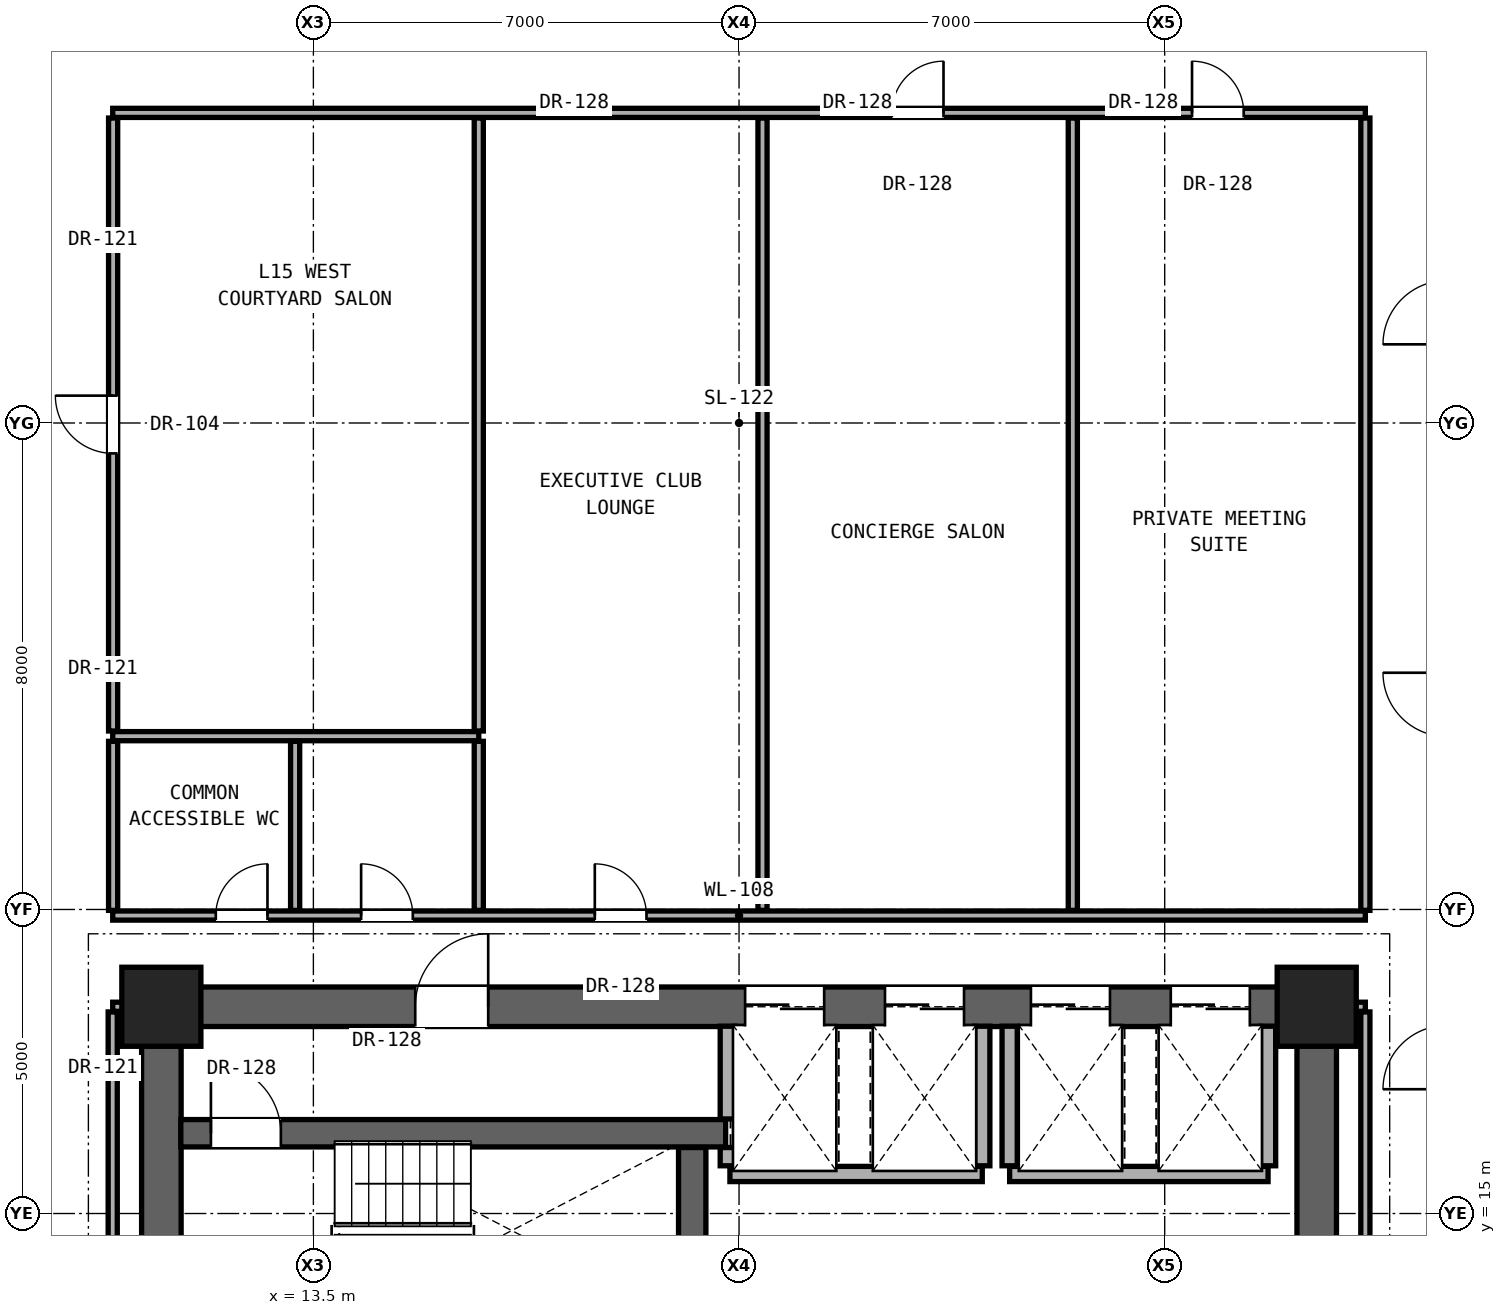
"""IFC4 building model, lengths in metres.
Left out: names, types, materials, properties, quantities, classifications, styles, units other than length and angle.
Written with IfcOpenShell. Run it as: python <this file> out.ifc"""

import sys

from ifc_helpers import new_model, si_unit, direction, frame, frame_2d, origin, origin_2d, place, context, subcontext, project, spatial, rectangle, extrude, element, fill, save


model = new_model("IFC4")
c1 = context("Model", 3, precision=1e-05, world=origin(), true_north=direction((0.0, 1.0)))
c2 = subcontext(c1, "Body", "Model", "MODEL_VIEW")
j1 = project(units=[si_unit("LENGTHUNIT", "METRE"), si_unit("PLANEANGLEUNIT", "RADIAN")], contexts=[c1])
p1 = place(None, origin())
s1 = spatial("IfcSite", under=j1, at=p1, CompositionType="ELEMENT")
p2 = place(p1, origin())
s2 = spatial("IfcBuilding", under=s1, at=p2, CompositionType="ELEMENT")
p3 = place(p2, frame((0.0, 0.0, 55.4)))
s3 = spatial("IfcBuildingStorey", under=s2, at=p3, CompositionType="ELEMENT", Elevation=55.4)
for number, where, z_axis, x_axis in (
    (1, (11.0, 18.4, 0.0), (0.0, 0.0, 1.0), (1.0, 0.0, 0.0)),
    (2, (30.0, 18.4, 0.0), (0.0, 0.0, 1.0), (1.0, 0.0, 0.0)),
):
    element("IfcColumn", number, at=place(p3, frame(where, z_axis=z_axis, x_axis=x_axis)), inside=s3, PredefinedType="COLUMN", context=c2, shape_type="SweptSolid", body=[
        extrude(rectangle(XDim=1.3, YDim=1.3, at=origin_2d()), origin(), (0.0, 0.0, 1.0), 3.3),
    ])
for number, where, z_axis, x_axis in (
    (3, (11.0, 12.4, 0.0), (0.0, 0.0, 1.0), (0.0, 1.0, 0.0)),
    (4, (30.0, 12.4, 0.0), (0.0, 0.0, 1.0), (0.0, 1.0, 0.0)),
):
    element("IfcWall", number, at=place(p3, frame(where, z_axis=z_axis, x_axis=x_axis)), inside=s3, PredefinedType="SHEAR", context=c2, shape_type="SweptSolid", body=[
        extrude(rectangle(XDim=6.0, YDim=0.65, at=frame_2d((3.0, 0.0))), origin(), (0.0, 0.0, 1.0), 3.06),
    ])
p4 = place(p3, frame((11.0, 18.4, 0.0), z_axis=(0.0, 0.0, 1.0), x_axis=(1.0, 0.0, 0.0)))
e5 = element("IfcWall", 5, at=p4, inside=s3, PredefinedType="SHEAR", context=c2, shape_type="SweptSolid", body=[
    extrude(rectangle(XDim=19.0, YDim=0.65, at=frame_2d((9.5, 0.0))), origin(), (0.0, 0.0, 1.0), 3.06),
])
p5 = place(p4, frame((4.175, 0.0, 0.0)))
e6 = element("IfcOpeningElement", 6, at=p5, cuts=e5, PredefinedType="OPENING", context=c2, shape_type="SweptSolid", body=[
    extrude(rectangle(XDim=1.2, YDim=2.25, at=frame_2d((0.6, 1.125))), frame((0.0, 0.335, 0.0), z_axis=(0.0, -1.0, 0.0), x_axis=(1.0, 0.0, 0.0)), (0.0, 0.0, 1.0), 0.67),
])
p6 = place(p4, frame((9.6, 0.0, 0.0)))
e7 = element("IfcOpeningElement", 7, at=p6, cuts=e5, PredefinedType="OPENING", context=c2, shape_type="SweptSolid", body=[
    extrude(rectangle(XDim=1.3, YDim=2.3, at=frame_2d((0.65, 1.15))), frame((0.0, 0.335, 0.0), z_axis=(0.0, -1.0, 0.0), x_axis=(1.0, 0.0, 0.0)), (0.0, 0.0, 1.0), 0.67),
])
p7 = place(p4, frame((11.9, 0.0, 0.0)))
e8 = element("IfcOpeningElement", 8, at=p7, cuts=e5, PredefinedType="OPENING", context=c2, shape_type="SweptSolid", body=[
    extrude(rectangle(XDim=1.3, YDim=2.3, at=frame_2d((0.65, 1.15))), frame((0.0, 0.335, 0.0), z_axis=(0.0, -1.0, 0.0), x_axis=(1.0, 0.0, 0.0)), (0.0, 0.0, 1.0), 0.67),
])
p8 = place(p4, frame((14.3, 0.0, 0.0)))
e9 = element("IfcOpeningElement", 9, at=p8, cuts=e5, PredefinedType="OPENING", context=c2, shape_type="SweptSolid", body=[
    extrude(rectangle(XDim=1.3, YDim=2.3, at=frame_2d((0.65, 1.15))), frame((0.0, 0.335, 0.0), z_axis=(0.0, -1.0, 0.0), x_axis=(1.0, 0.0, 0.0)), (0.0, 0.0, 1.0), 0.67),
])
p9 = place(p4, frame((16.6, 0.0, 0.0)))
e10 = element("IfcOpeningElement", 10, at=p9, cuts=e5, PredefinedType="OPENING", context=c2, shape_type="SweptSolid", body=[
    extrude(rectangle(XDim=1.3, YDim=2.3, at=frame_2d((0.65, 1.15))), frame((0.0, 0.335, 0.0), z_axis=(0.0, -1.0, 0.0), x_axis=(1.0, 0.0, 0.0)), (0.0, 0.0, 1.0), 0.67),
])
p10 = place(p3, frame((20.35, 15.65, 0.0), z_axis=(0.0, 0.0, 1.0), x_axis=(1.0, 0.0, 0.0)))
e11 = element("IfcWall", 11, at=p10, inside=s3, PredefinedType="SOLIDWALL", context=c2, shape_type="SweptSolid", body=[
    extrude(rectangle(XDim=4.15, YDim=0.25, at=frame_2d((2.075, 0.0))), origin(), (0.0, 0.0, 1.0), 3.06),
])
p11 = place(p3, frame((24.95, 15.65, 0.0), z_axis=(0.0, 0.0, 1.0), x_axis=(1.0, 0.0, 0.0)))
e12 = element("IfcWall", 12, at=p11, inside=s3, PredefinedType="SOLIDWALL", context=c2, shape_type="SweptSolid", body=[
    extrude(rectangle(XDim=4.25, YDim=0.25, at=frame_2d((2.125, 0.0))), origin(), (0.0, 0.0, 1.0), 3.06),
])
p12 = place(p3, frame((11.32, 16.32, 0.0), z_axis=(0.0, 0.0, 1.0), x_axis=(1.0, 0.0, 0.0)))
e13 = element("IfcWall", 13, at=p12, inside=s3, PredefinedType="SHEAR", context=c2, shape_type="SweptSolid", body=[
    extrude(rectangle(XDim=8.96, YDim=0.45, at=frame_2d((4.48, 0.0))), origin(), (0.0, 0.0, 1.0), 3.06),
])
p13 = place(p12, frame((0.495, 0.0, 0.0)))
e14 = element("IfcOpeningElement", 14, at=p13, cuts=e13, PredefinedType="OPENING", context=c2, shape_type="SweptSolid", body=[
    extrude(rectangle(XDim=1.15, YDim=2.2, at=frame_2d((0.575, 1.1))), frame((0.0, 0.235, 0.0), z_axis=(0.0, -1.0, 0.0), x_axis=(1.0, 0.0, 0.0)), (0.0, 0.0, 1.0), 0.47),
])
for number, where, z_axis, x_axis in (
    (15, (10.2, 18.4, 0.0), (0.0, 0.0, 1.0), (1.0, 0.0, 0.0)),
    (16, (30.32, 18.4, 0.0), (0.0, 0.0, 1.0), (1.0, 0.0, 0.0)),
):
    element("IfcWall", number, at=place(p3, frame(where, z_axis=z_axis, x_axis=x_axis)), inside=s3, PredefinedType="PARTITIONING", context=c2, shape_type="SweptSolid", body=[
        extrude(rectangle(XDim=0.48, YDim=0.15, at=frame_2d((0.24, 0.0))), origin(), (0.0, 0.0, 1.0), 2.436),
    ])
p14 = place(p3, frame((10.2, 19.9, 0.0), z_axis=(0.0, 0.0, 1.0), x_axis=(1.0, 0.0, 0.0)))
e17 = element("IfcWall", 17, at=p14, inside=s3, PredefinedType="PARTITIONING", context=c2, shape_type="SweptSolid", body=[
    extrude(rectangle(XDim=20.6, YDim=0.15, at=frame_2d((10.3, 0.0))), origin(), (0.0, 0.0, 1.0), 2.104),
])
p15 = place(p14, frame((1.695, 0.0, 0.0)))
e18 = element("IfcOpeningElement", 18, at=p15, cuts=e17, PredefinedType="OPENING", context=c2, shape_type="SweptSolid", body=[
    extrude(rectangle(XDim=0.85, YDim=2.01, at=frame_2d((0.425, 1.005))), frame((0.0, 0.085, 0.0), z_axis=(0.0, -1.0, 0.0), x_axis=(1.0, 0.0, 0.0)), (0.0, 0.0, 1.0), 0.17),
])
p16 = place(p14, frame((4.085, 0.0, 0.0)))
e19 = element("IfcOpeningElement", 19, at=p16, cuts=e17, PredefinedType="OPENING", context=c2, shape_type="SweptSolid", body=[
    extrude(rectangle(XDim=0.85, YDim=2.01, at=frame_2d((0.425, 1.005))), frame((0.0, 0.085, 0.0), z_axis=(0.0, -1.0, 0.0), x_axis=(1.0, 0.0, 0.0)), (0.0, 0.0, 1.0), 0.17),
])
p17 = place(p14, frame((7.928, 0.0, 0.0)))
e20 = element("IfcOpeningElement", 20, at=p17, cuts=e17, PredefinedType="OPENING", context=c2, shape_type="SweptSolid", body=[
    extrude(rectangle(XDim=0.85, YDim=2.01, at=frame_2d((0.425, 1.005))), frame((0.0, 0.085, 0.0), z_axis=(0.0, -1.0, 0.0), x_axis=(1.0, 0.0, 0.0)), (0.0, 0.0, 1.0), 0.17),
])
p18 = place(p3, frame((10.2, 22.85, 0.0), z_axis=(0.0, 0.0, 1.0), x_axis=(1.0, 0.0, 0.0)))
e21 = element("IfcWall", 21, at=p18, inside=s3, PredefinedType="PARTITIONING", context=c2, shape_type="SweptSolid", body=[
    extrude(rectangle(XDim=6.02, YDim=0.15, at=frame_2d((3.01, 0.0))), origin(), (0.0, 0.0, 1.0), 2.104),
])
p19 = place(p3, frame((10.2, 33.1, 0.0), z_axis=(0.0, 0.0, 1.0), x_axis=(1.0, 0.0, 0.0)))
e22 = element("IfcWall", 22, at=p19, inside=s3, PredefinedType="PARTITIONING", context=c2, shape_type="SweptSolid", body=[
    extrude(rectangle(XDim=20.6, YDim=0.15, at=frame_2d((10.3, 0.0))), origin(), (0.0, 0.0, 1.0), 2.104),
])
p20 = place(p19, frame((12.812, 0.0, 0.0)))
e23 = element("IfcOpeningElement", 23, at=p20, cuts=e22, PredefinedType="OPENING", context=c2, shape_type="SweptSolid", body=[
    extrude(rectangle(XDim=0.85, YDim=2.01, at=frame_2d((0.425, 1.005))), frame((0.0, 0.085, 0.0), z_axis=(0.0, -1.0, 0.0), x_axis=(1.0, 0.0, 0.0)), (0.0, 0.0, 1.0), 0.17),
])
p21 = place(p19, frame((17.75, 0.0, 0.0)))
e24 = element("IfcOpeningElement", 24, at=p21, cuts=e22, PredefinedType="OPENING", context=c2, shape_type="SweptSolid", body=[
    extrude(rectangle(XDim=0.85, YDim=2.01, at=frame_2d((0.425, 1.005))), frame((0.0, 0.085, 0.0), z_axis=(0.0, -1.0, 0.0), x_axis=(1.0, 0.0, 0.0)), (0.0, 0.0, 1.0), 0.17),
])
p22 = place(p3, frame((10.2, 12.335, 0.0), z_axis=(0.0, 0.0, 1.0), x_axis=(0.0, 1.0, 0.0)))
e25 = element("IfcWall", 25, at=p22, inside=s3, PredefinedType="PARTITIONING", context=c2, shape_type="SweptSolid", body=[
    extrude(rectangle(XDim=5.98, YDim=0.15, at=frame_2d((2.99, 0.0))), origin(), (0.0, 0.0, 1.0), 2.436),
])
p23 = place(p3, frame((10.207, 19.985, 0.0), z_axis=(0.0, 0.0, 1.0), x_axis=(0.0, 1.0, 0.0)))
e26 = element("IfcWall", 26, at=p23, inside=s3, PredefinedType="PARTITIONING", context=c2, shape_type="SweptSolid", body=[
    extrude(rectangle(XDim=2.78, YDim=0.15, at=frame_2d((1.39, 0.0))), origin(), (0.0, 0.0, 1.0), 3.06),
])
p24 = place(p3, frame((10.207, 22.935, 0.0), z_axis=(0.0, 0.0, 1.0), x_axis=(0.0, 1.0, 0.0)))
e27 = element("IfcWall", 27, at=p24, inside=s3, PredefinedType="PARTITIONING", context=c2, shape_type="SweptSolid", body=[
    extrude(rectangle(XDim=10.08, YDim=0.15, at=frame_2d((5.04, 0.0))), origin(), (0.0, 0.0, 1.0), 2.279),
])
p25 = place(p24, frame((4.565, 0.0, 0.0)))
e28 = element("IfcOpeningElement", 28, at=p25, cuts=e27, PredefinedType="OPENING", context=c2, shape_type="SweptSolid", body=[
    extrude(rectangle(XDim=0.95, YDim=2.15, at=frame_2d((0.475, 1.075))), frame((0.0, 0.085, 0.0), z_axis=(0.0, -1.0, 0.0), x_axis=(1.0, 0.0, 0.0)), (0.0, 0.0, 1.0), 0.17),
])
for number, where, z_axis, x_axis in (
    (29, (13.2, 19.985, 0.0), (0.0, 0.0, 1.0), (0.0, 1.0, 0.0)),
    (30, (16.22, 19.985, 0.0), (0.0, 0.0, 1.0), (0.0, 1.0, 0.0)),
):
    element("IfcWall", number, at=place(p3, frame(where, z_axis=z_axis, x_axis=x_axis)), inside=s3, PredefinedType="PARTITIONING", context=c2, shape_type="SweptSolid", body=[
        extrude(rectangle(XDim=2.78, YDim=0.15, at=frame_2d((1.39, 0.0))), origin(), (0.0, 0.0, 1.0), 3.06),
    ])
p26 = place(p3, frame((16.22, 22.935, 0.0), z_axis=(0.0, 0.0, 1.0), x_axis=(0.0, 1.0, 0.0)))
e31 = element("IfcWall", 31, at=p26, inside=s3, PredefinedType="PARTITIONING", context=c2, shape_type="SweptSolid", body=[
    extrude(rectangle(XDim=10.08, YDim=0.15, at=frame_2d((5.04, 0.0))), origin(), (0.0, 0.0, 1.0), 2.104),
])
p27 = place(p3, frame((19.73, 13.355, 0.0), z_axis=(0.0, 0.0, 1.0), x_axis=(0.0, 1.0, 0.0)))
e32 = element("IfcWall", 32, at=p27, inside=s3, PredefinedType="SHEAR", context=c2, shape_type="SweptSolid", body=[
    extrude(rectangle(XDim=2.73, YDim=0.45, at=frame_2d((1.365, 0.0))), origin(), (0.0, 0.0, 1.0), 3.06),
])
p28 = place(p3, frame((20.315, 15.785, 0.0), z_axis=(0.0, 0.0, 1.0), x_axis=(0.0, 1.0, 0.0)))
e33 = element("IfcWall", 33, at=p28, inside=s3, PredefinedType="SOLIDWALL", context=c2, shape_type="SweptSolid", body=[
    extrude(rectangle(XDim=0.3, YDim=0.25, at=frame_2d((0.15, 0.0))), origin(), (0.0, 0.0, 1.0), 3.06),
])
p29 = place(p3, frame((20.315, 16.555, 0.0), z_axis=(0.0, 0.0, 1.0), x_axis=(0.0, 1.0, 0.0)))
e34 = element("IfcWall", 34, at=p29, inside=s3, PredefinedType="SOLIDWALL", context=c2, shape_type="SweptSolid", body=[
    extrude(rectangle(XDim=1.525, YDim=0.25, at=frame_2d((0.763, 0.0))), origin(), (0.0, 0.0, 1.0), 3.06),
])
p30 = place(p3, frame((20.886, 19.985, 0.0), z_axis=(0.0, 0.0, 1.0), x_axis=(0.0, 1.0, 0.0)))
e35 = element("IfcWall", 35, at=p30, inside=s3, PredefinedType="PARTITIONING", context=c2, shape_type="SweptSolid", body=[
    extrude(rectangle(XDim=13.03, YDim=0.15, at=frame_2d((6.515, 0.0))), origin(), (0.0, 0.0, 1.0), 2.104),
])
for number, where, z_axis, x_axis in (
    (36, (24.5, 15.785, 0.0), (0.0, 0.0, 1.0), (0.0, 1.0, 0.0)),
    (37, (24.95, 15.785, 0.0), (0.0, 0.0, 1.0), (0.0, 1.0, 0.0)),
):
    element("IfcWall", number, at=place(p3, frame(where, z_axis=z_axis, x_axis=x_axis)), inside=s3, PredefinedType="SOLIDWALL", context=c2, shape_type="SweptSolid", body=[
        extrude(rectangle(XDim=2.295, YDim=0.25, at=frame_2d((1.147, 0.0))), origin(), (0.0, 0.0, 1.0), 3.06),
    ])
p31 = place(p3, frame((25.989, 19.985, 0.0), z_axis=(0.0, 0.0, 1.0), x_axis=(0.0, 1.0, 0.0)))
e38 = element("IfcWall", 38, at=p31, inside=s3, PredefinedType="PARTITIONING", context=c2, shape_type="SweptSolid", body=[
    extrude(rectangle(XDim=13.03, YDim=0.15, at=frame_2d((6.515, 0.0))), origin(), (0.0, 0.0, 1.0), 2.104),
])
p32 = place(p3, frame((29.2, 15.785, 0.0), z_axis=(0.0, 0.0, 1.0), x_axis=(0.0, 1.0, 0.0)))
e39 = element("IfcWall", 39, at=p32, inside=s3, PredefinedType="SOLIDWALL", context=c2, shape_type="SweptSolid", body=[
    extrude(rectangle(XDim=2.295, YDim=0.25, at=frame_2d((1.147, 0.0))), origin(), (0.0, 0.0, 1.0), 3.06),
])
p33 = place(p3, frame((30.8, 12.335, 0.0), z_axis=(0.0, 0.0, 1.0), x_axis=(0.0, 1.0, 0.0)))
e40 = element("IfcWall", 40, at=p33, inside=s3, PredefinedType="PARTITIONING", context=c2, shape_type="SweptSolid", body=[
    extrude(rectangle(XDim=5.98, YDim=0.15, at=frame_2d((2.99, 0.0))), origin(), (0.0, 0.0, 1.0), 2.436),
])
p34 = place(p3, frame((30.8, 19.985, 0.0), z_axis=(0.0, 0.0, 1.0), x_axis=(0.0, 1.0, 0.0)))
e41 = element("IfcWall", 41, at=p34, inside=s3, PredefinedType="PARTITIONING", context=c2, shape_type="SweptSolid", body=[
    extrude(rectangle(XDim=13.03, YDim=0.15, at=frame_2d((6.515, 0.0))), origin(), (0.0, 0.0, 1.0), 2.279),
])
p35 = place(p5, origin())
e42 = element("IfcDoor", 42, at=p35, inside=s3, OperationType="SINGLE_SWING_RIGHT", PredefinedType="DOOR", context=c2, shape_type="SweptSolid", body=[
    extrude(rectangle(XDim=1.2, YDim=2.25, at=frame_2d((0.6, 1.125))), frame((0.0, 0.025, 0.0), z_axis=(0.0, -1.0, 0.0), x_axis=(1.0, 0.0, 0.0)), (0.0, 0.0, 1.0), 0.05),
])
fill(e6, e42)
p36 = place(p13, origin())
e43 = element("IfcDoor", 43, at=p36, inside=s3, OperationType="SINGLE_SWING_LEFT", PredefinedType="DOOR", context=c2, shape_type="SweptSolid", body=[
    extrude(rectangle(XDim=1.15, YDim=2.2, at=frame_2d((0.575, 1.1))), frame((0.0, 0.025, 0.0), z_axis=(0.0, -1.0, 0.0), x_axis=(1.0, 0.0, 0.0)), (0.0, 0.0, 1.0), 0.05),
])
fill(e14, e43)
p37 = place(p15, origin())
e44 = element("IfcDoor", 44, at=p37, inside=s3, OperationType="SINGLE_SWING_RIGHT", PredefinedType="DOOR", context=c2, shape_type="SweptSolid", body=[
    extrude(rectangle(XDim=0.85, YDim=2.01, at=frame_2d((0.425, 1.005))), frame((0.0, 0.025, 0.0), z_axis=(0.0, -1.0, 0.0), x_axis=(1.0, 0.0, 0.0)), (0.0, 0.0, 1.0), 0.05),
])
fill(e18, e44)
p38 = place(p16, origin())
e45 = element("IfcDoor", 45, at=p38, inside=s3, OperationType="SINGLE_SWING_LEFT", PredefinedType="DOOR", context=c2, shape_type="SweptSolid", body=[
    extrude(rectangle(XDim=0.85, YDim=2.01, at=frame_2d((0.425, 1.005))), frame((0.0, 0.025, 0.0), z_axis=(0.0, -1.0, 0.0), x_axis=(1.0, 0.0, 0.0)), (0.0, 0.0, 1.0), 0.05),
])
fill(e19, e45)
p39 = place(p25, origin())
e46 = element("IfcDoor", 46, at=p39, inside=s3, OperationType="SINGLE_SWING_RIGHT", PredefinedType="DOOR", context=c2, shape_type="SweptSolid", body=[
    extrude(rectangle(XDim=0.95, YDim=2.15, at=frame_2d((0.475, 1.075))), frame((0.0, 0.025, 0.0), z_axis=(0.0, -1.0, 0.0), x_axis=(1.0, 0.0, 0.0)), (0.0, 0.0, 1.0), 0.05),
])
fill(e28, e46)
p40 = place(p17, origin())
e47 = element("IfcDoor", 47, at=p40, inside=s3, OperationType="SINGLE_SWING_LEFT", PredefinedType="DOOR", context=c2, shape_type="SweptSolid", body=[
    extrude(rectangle(XDim=0.85, YDim=2.01, at=frame_2d((0.425, 1.005))), frame((0.0, 0.025, 0.0), z_axis=(0.0, -1.0, 0.0), x_axis=(1.0, 0.0, 0.0)), (0.0, 0.0, 1.0), 0.05),
])
fill(e20, e47)
p41 = place(p20, origin())
e48 = element("IfcDoor", 48, at=p41, inside=s3, OperationType="SINGLE_SWING_RIGHT", PredefinedType="DOOR", context=c2, shape_type="SweptSolid", body=[
    extrude(rectangle(XDim=0.85, YDim=2.01, at=frame_2d((0.425, 1.005))), frame((0.0, 0.025, 0.0), z_axis=(0.0, -1.0, 0.0), x_axis=(1.0, 0.0, 0.0)), (0.0, 0.0, 1.0), 0.05),
])
fill(e23, e48)
p42 = place(p21, origin())
e49 = element("IfcDoor", 49, at=p42, inside=s3, OperationType="SINGLE_SWING_LEFT", PredefinedType="DOOR", context=c2, shape_type="SweptSolid", body=[
    extrude(rectangle(XDim=0.85, YDim=2.01, at=frame_2d((0.425, 1.005))), frame((0.0, 0.025, 0.0), z_axis=(0.0, -1.0, 0.0), x_axis=(1.0, 0.0, 0.0)), (0.0, 0.0, 1.0), 0.05),
])
fill(e24, e49)
p43 = place(p6, origin())
e50 = element("IfcDoor", 50, at=p43, inside=s3, OperationType="DOUBLE_DOOR_SLIDING", PredefinedType="DOOR", context=c2, shape_type="SweptSolid", body=[
    extrude(rectangle(XDim=1.3, YDim=2.3, at=frame_2d((0.65, 1.15))), frame((0.0, 0.025, 0.0), z_axis=(0.0, -1.0, 0.0), x_axis=(1.0, 0.0, 0.0)), (0.0, 0.0, 1.0), 0.05),
])
fill(e7, e50)
p44 = place(p7, origin())
e51 = element("IfcDoor", 51, at=p44, inside=s3, OperationType="DOUBLE_DOOR_SLIDING", PredefinedType="DOOR", context=c2, shape_type="SweptSolid", body=[
    extrude(rectangle(XDim=1.3, YDim=2.3, at=frame_2d((0.65, 1.15))), frame((0.0, 0.025, 0.0), z_axis=(0.0, -1.0, 0.0), x_axis=(1.0, 0.0, 0.0)), (0.0, 0.0, 1.0), 0.05),
])
fill(e8, e51)
p45 = place(p8, origin())
e52 = element("IfcDoor", 52, at=p45, inside=s3, OperationType="DOUBLE_DOOR_SLIDING", PredefinedType="DOOR", context=c2, shape_type="SweptSolid", body=[
    extrude(rectangle(XDim=1.3, YDim=2.3, at=frame_2d((0.65, 1.15))), frame((0.0, 0.025, 0.0), z_axis=(0.0, -1.0, 0.0), x_axis=(1.0, 0.0, 0.0)), (0.0, 0.0, 1.0), 0.05),
])
fill(e9, e52)
p46 = place(p9, origin())
e53 = element("IfcDoor", 53, at=p46, inside=s3, OperationType="DOUBLE_DOOR_SLIDING", PredefinedType="DOOR", context=c2, shape_type="SweptSolid", body=[
    extrude(rectangle(XDim=1.3, YDim=2.3, at=frame_2d((0.65, 1.15))), frame((0.0, 0.025, 0.0), z_axis=(0.0, -1.0, 0.0), x_axis=(1.0, 0.0, 0.0)), (0.0, 0.0, 1.0), 0.05),
])
fill(e10, e53)
save(model, sys.argv[1])
